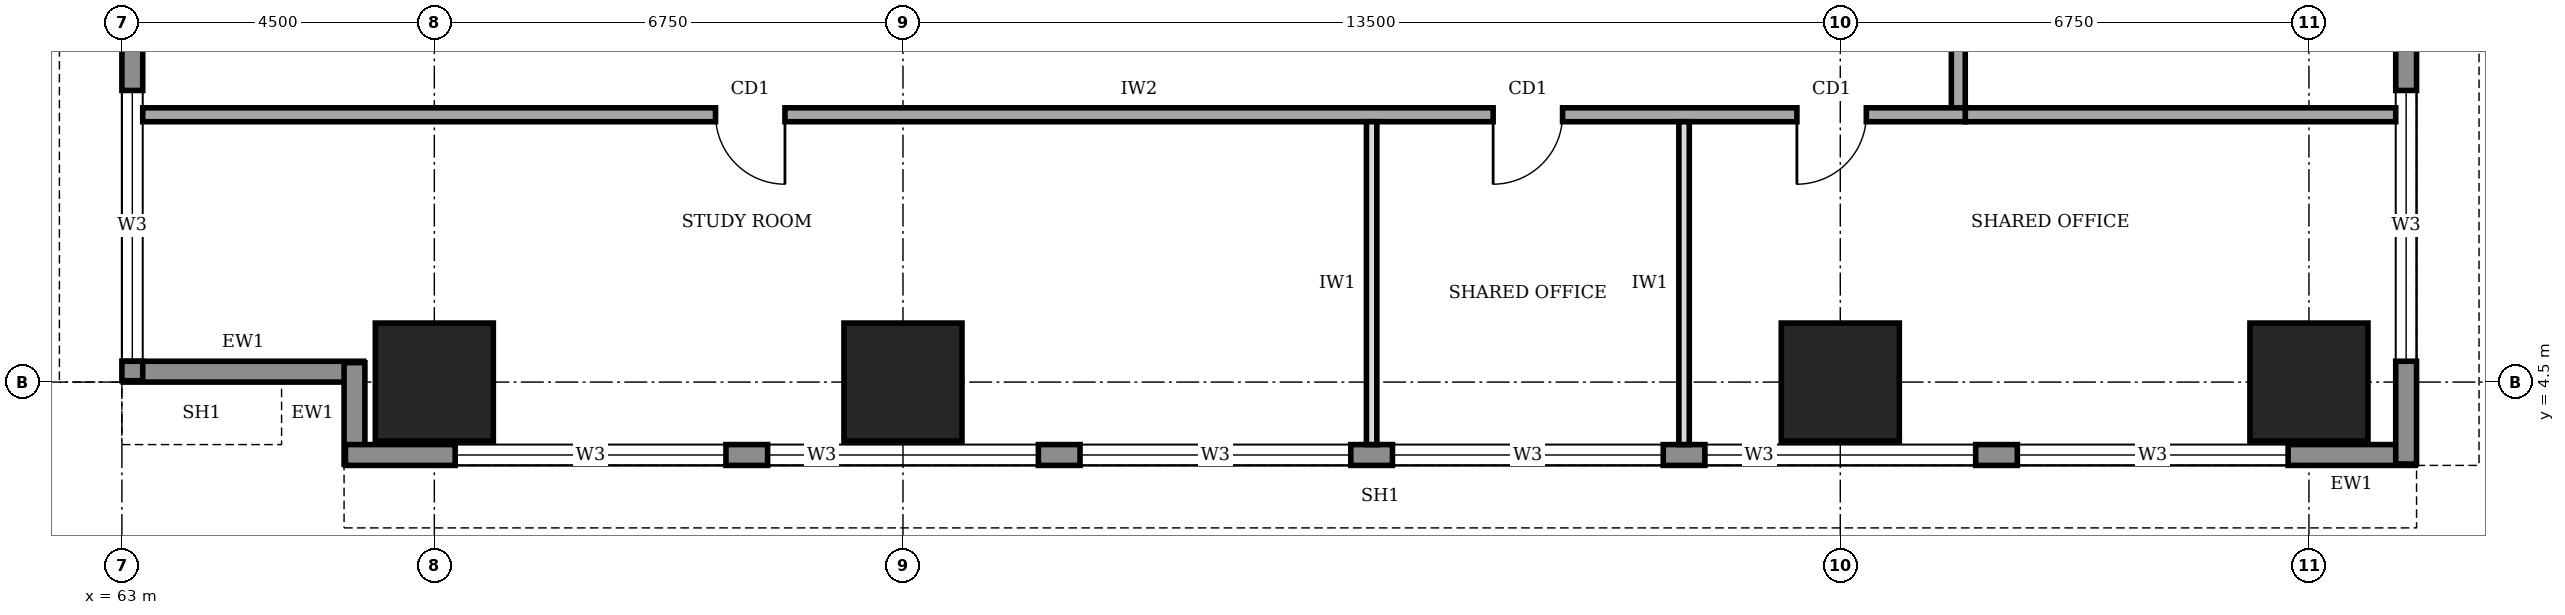
"""IFC4 building model, lengths in metres.
Left out: names, types, materials, properties, quantities, classifications, styles, units other than length and angle.
Written with IfcOpenShell. Run it as: python <this file> out.ifc"""

import sys

from ifc_helpers import new_model, si_unit, direction, frame, frame_2d, origin, origin_2d, place, context, subcontext, project, spatial, rectangle, extrude, element, fill, save


model = new_model("IFC4")
c1 = context("Model", 3, precision=1e-05, world=origin(), true_north=direction((0.0, 1.0)))
c2 = subcontext(c1, "Body", "Model", "MODEL_VIEW")
j1 = project(units=[si_unit("LENGTHUNIT", "METRE"), si_unit("PLANEANGLEUNIT", "RADIAN")], contexts=[c1])
p1 = place(None, origin())
s1 = spatial("IfcSite", under=j1, at=p1, CompositionType="ELEMENT")
p2 = place(p1, origin())
s2 = spatial("IfcBuilding", under=s1, at=p2, CompositionType="ELEMENT")
p3 = place(p2, frame((0.0, 0.0, 101.0)))
s3 = spatial("IfcBuildingStorey", under=s2, at=p3, CompositionType="ELEMENT", Elevation=101.0)
for number, where, z_axis, x_axis in (
    (1, (67.5, 4.5, 0.0), (0.0, 0.0, 1.0), (1.0, 0.0, 0.0)),
    (2, (74.25, 4.5, 0.0), (0.0, 0.0, 1.0), (1.0, 0.0, 0.0)),
    (3, (87.75, 4.5, 0.0), (0.0, 0.0, 1.0), (1.0, 0.0, 0.0)),
    (4, (94.5, 4.5, 0.0), (0.0, 0.0, 1.0), (1.0, 0.0, 0.0)),
):
    element("IfcColumn", number, at=place(p3, frame(where, z_axis=z_axis, x_axis=x_axis)), inside=s3, PredefinedType="COLUMN", context=c2, shape_type="SweptSolid", body=[
        extrude(rectangle(XDim=1.7, YDim=1.7, at=origin_2d()), origin(), (0.0, 0.0, 1.0), 4.0),
    ])
p4 = place(p3, frame((63.02, 4.65, 0.0), z_axis=(0.0, 0.0, 1.0), x_axis=(1.0, 0.0, 0.0)))
e5 = element("IfcWall", 5, at=p4, inside=s3, PredefinedType="STANDARD", context=c2, shape_type="SweptSolid", body=[
    extrude(rectangle(XDim=3.46, YDim=0.3, at=frame_2d((1.73, 0.0))), origin(), (0.0, 0.0, 1.0), 2.85),
])
p5 = place(p3, frame((66.35, 4.78, 0.0), z_axis=(0.0, 0.0, 1.0), x_axis=(0.0, -1.0, 0.0)))
e6 = element("IfcWall", 6, at=p5, inside=s3, PredefinedType="STANDARD", context=c2, shape_type="SweptSolid", body=[
    extrude(rectangle(XDim=1.46, YDim=0.3, at=frame_2d((0.73, 0.0))), origin(), (0.0, 0.0, 1.0), 3.75),
])
p6 = place(p3, frame((66.22, 3.45, 0.0), z_axis=(0.0, 0.0, 1.0), x_axis=(1.0, 0.0, 0.0)))
e7 = element("IfcWall", 7, at=p6, inside=s3, PredefinedType="STANDARD", context=c2, shape_type="SweptSolid", body=[
    extrude(rectangle(XDim=29.81, YDim=0.3, at=frame_2d((14.905, 0.0))), origin(), (0.0, 0.0, 1.0), 3.75),
])
p7 = place(p6, frame((1.58, 0.0, 0.95)))
e8 = element("IfcOpeningElement", 8, at=p7, cuts=e7, PredefinedType="OPENING", context=c2, shape_type="SweptSolid", body=[
    extrude(rectangle(XDim=3.9, YDim=1.8, at=frame_2d((1.95, 0.9))), frame((0.0, 0.16, 0.0), z_axis=(0.0, -1.0, 0.0), x_axis=(1.0, 0.0, 0.0)), (0.0, 0.0, 1.0), 0.32),
])
p8 = place(p6, frame((6.08, 0.0, 0.95)))
e9 = element("IfcOpeningElement", 9, at=p8, cuts=e7, PredefinedType="OPENING", context=c2, shape_type="SweptSolid", body=[
    extrude(rectangle(XDim=3.9, YDim=1.8, at=frame_2d((1.95, 0.9))), frame((0.0, 0.16, 0.0), z_axis=(0.0, -1.0, 0.0), x_axis=(1.0, 0.0, 0.0)), (0.0, 0.0, 1.0), 0.32),
])
p9 = place(p6, frame((10.58, 0.0, 0.95)))
e10 = element("IfcOpeningElement", 10, at=p9, cuts=e7, PredefinedType="OPENING", context=c2, shape_type="SweptSolid", body=[
    extrude(rectangle(XDim=3.9, YDim=1.8, at=frame_2d((1.95, 0.9))), frame((0.0, 0.16, 0.0), z_axis=(0.0, -1.0, 0.0), x_axis=(1.0, 0.0, 0.0)), (0.0, 0.0, 1.0), 0.32),
])
p10 = place(p6, frame((15.08, 0.0, 0.95)))
e11 = element("IfcOpeningElement", 11, at=p10, cuts=e7, PredefinedType="OPENING", context=c2, shape_type="SweptSolid", body=[
    extrude(rectangle(XDim=3.9, YDim=1.8, at=frame_2d((1.95, 0.9))), frame((0.0, 0.16, 0.0), z_axis=(0.0, -1.0, 0.0), x_axis=(1.0, 0.0, 0.0)), (0.0, 0.0, 1.0), 0.32),
])
p11 = place(p6, frame((19.58, 0.0, 0.95)))
e12 = element("IfcOpeningElement", 12, at=p11, cuts=e7, PredefinedType="OPENING", context=c2, shape_type="SweptSolid", body=[
    extrude(rectangle(XDim=3.9, YDim=1.8, at=frame_2d((1.95, 0.9))), frame((0.0, 0.16, 0.0), z_axis=(0.0, -1.0, 0.0), x_axis=(1.0, 0.0, 0.0)), (0.0, 0.0, 1.0), 0.32),
])
p12 = place(p6, frame((24.08, 0.0, 0.95)))
e13 = element("IfcOpeningElement", 13, at=p12, cuts=e7, PredefinedType="OPENING", context=c2, shape_type="SweptSolid", body=[
    extrude(rectangle(XDim=3.9, YDim=1.8, at=frame_2d((1.95, 0.9))), frame((0.0, 0.16, 0.0), z_axis=(0.0, -1.0, 0.0), x_axis=(1.0, 0.0, 0.0)), (0.0, 0.0, 1.0), 0.32),
])
p13 = place(p3, frame((95.9, 3.32, 0.0), z_axis=(0.0, 0.0, 1.0), x_axis=(0.0, 1.0, 0.0)))
e14 = element("IfcWall", 14, at=p13, inside=s3, PredefinedType="STANDARD", context=c2, shape_type="SweptSolid", body=[
    extrude(rectangle(XDim=33.96, YDim=0.3, at=frame_2d((16.98, 0.0))), origin(), (0.0, 0.0, 1.0), 3.75),
])
p14 = place(p13, frame((1.48, 0.0, 0.95)))
e15 = element("IfcOpeningElement", 15, at=p14, cuts=e14, PredefinedType="OPENING", context=c2, shape_type="SweptSolid", body=[
    extrude(rectangle(XDim=3.9, YDim=1.8, at=frame_2d((1.95, 0.9))), frame((0.0, 0.16, 0.0), z_axis=(0.0, -1.0, 0.0), x_axis=(1.0, 0.0, 0.0)), (0.0, 0.0, 1.0), 0.32),
])
p15 = place(p13, frame((5.98, 0.0, 0.95)))
e16 = element("IfcOpeningElement", 16, at=p15, cuts=e14, PredefinedType="OPENING", context=c2, shape_type="SweptSolid", body=[
    extrude(rectangle(XDim=3.9, YDim=1.8, at=frame_2d((1.95, 0.9))), frame((0.0, 0.16, 0.0), z_axis=(0.0, -1.0, 0.0), x_axis=(1.0, 0.0, 0.0)), (0.0, 0.0, 1.0), 0.32),
])
p16 = place(p13, frame((10.48, 0.0, 0.95)))
e17 = element("IfcOpeningElement", 17, at=p16, cuts=e14, PredefinedType="OPENING", context=c2, shape_type="SweptSolid", body=[
    extrude(rectangle(XDim=3.9, YDim=1.8, at=frame_2d((1.95, 0.9))), frame((0.0, 0.16, 0.0), z_axis=(0.0, -1.0, 0.0), x_axis=(1.0, 0.0, 0.0)), (0.0, 0.0, 1.0), 0.32),
])
p17 = place(p13, frame((14.98, 0.0, 0.95)))
e18 = element("IfcOpeningElement", 18, at=p17, cuts=e14, PredefinedType="OPENING", context=c2, shape_type="SweptSolid", body=[
    extrude(rectangle(XDim=3.9, YDim=1.8, at=frame_2d((1.95, 0.9))), frame((0.0, 0.16, 0.0), z_axis=(0.0, -1.0, 0.0), x_axis=(1.0, 0.0, 0.0)), (0.0, 0.0, 1.0), 0.32),
])
p18 = place(p13, frame((19.48, 0.0, 0.95)))
e19 = element("IfcOpeningElement", 19, at=p18, cuts=e14, PredefinedType="OPENING", context=c2, shape_type="SweptSolid", body=[
    extrude(rectangle(XDim=3.9, YDim=1.8, at=frame_2d((1.95, 0.9))), frame((0.0, 0.16, 0.0), z_axis=(0.0, -1.0, 0.0), x_axis=(1.0, 0.0, 0.0)), (0.0, 0.0, 1.0), 0.32),
])
p19 = place(p13, frame((23.98, 0.0, 0.95)))
e20 = element("IfcOpeningElement", 20, at=p19, cuts=e14, PredefinedType="OPENING", context=c2, shape_type="SweptSolid", body=[
    extrude(rectangle(XDim=3.9, YDim=1.8, at=frame_2d((1.95, 0.9))), frame((0.0, 0.16, 0.0), z_axis=(0.0, -1.0, 0.0), x_axis=(1.0, 0.0, 0.0)), (0.0, 0.0, 1.0), 0.32),
])
p20 = place(p13, frame((28.48, 0.0, 0.95)))
e21 = element("IfcOpeningElement", 21, at=p20, cuts=e14, PredefinedType="OPENING", context=c2, shape_type="SweptSolid", body=[
    extrude(rectangle(XDim=3.9, YDim=1.8, at=frame_2d((1.95, 0.9))), frame((0.0, 0.16, 0.0), z_axis=(0.0, -1.0, 0.0), x_axis=(1.0, 0.0, 0.0)), (0.0, 0.0, 1.0), 0.32),
])
p21 = place(p3, frame((63.3, 8.35, 0.0), z_axis=(0.0, 0.0, 1.0), x_axis=(1.0, 0.0, 0.0)))
e22 = element("IfcWall", 22, at=p21, inside=s3, PredefinedType="SOLIDWALL", context=c2, shape_type="SweptSolid", body=[
    extrude(rectangle(XDim=26.25, YDim=0.2, at=frame_2d((13.125, 0.0))), origin(), (0.0, 0.0, 1.0), 3.75),
])
p22 = place(p21, frame((8.25, 0.0, 0.0)))
e23 = element("IfcOpeningElement", 23, at=p22, cuts=e22, PredefinedType="OPENING", context=c2, shape_type="SweptSolid", body=[
    extrude(rectangle(XDim=1.0, YDim=2.1, at=frame_2d((0.5, 1.05))), frame((0.0, 0.11, 0.0), z_axis=(0.0, -1.0, 0.0), x_axis=(1.0, 0.0, 0.0)), (0.0, 0.0, 1.0), 0.22),
])
p23 = place(p21, frame((19.45, 0.0, 0.0)))
e24 = element("IfcOpeningElement", 24, at=p23, cuts=e22, PredefinedType="OPENING", context=c2, shape_type="SweptSolid", body=[
    extrude(rectangle(XDim=1.0, YDim=2.1, at=frame_2d((0.5, 1.05))), frame((0.0, 0.11, 0.0), z_axis=(0.0, -1.0, 0.0), x_axis=(1.0, 0.0, 0.0)), (0.0, 0.0, 1.0), 0.22),
])
p24 = place(p21, frame((23.825, 0.0, 0.0)))
e25 = element("IfcOpeningElement", 25, at=p24, cuts=e22, PredefinedType="OPENING", context=c2, shape_type="SweptSolid", body=[
    extrude(rectangle(XDim=1.0, YDim=2.1, at=frame_2d((0.5, 1.05))), frame((0.0, 0.11, 0.0), z_axis=(0.0, -1.0, 0.0), x_axis=(1.0, 0.0, 0.0)), (0.0, 0.0, 1.0), 0.22),
])
p25 = place(p3, frame((89.45, 8.45, 0.0), z_axis=(0.0, 0.0, 1.0), x_axis=(0.0, 1.0, 0.0)))
e26 = element("IfcWall", 26, at=p25, inside=s3, PredefinedType="SOLIDWALL", context=c2, shape_type="SweptSolid", body=[
    extrude(rectangle(XDim=23.8, YDim=0.2, at=frame_2d((11.9, 0.0))), origin(), (0.0, 0.0, 1.0), 3.75),
])
p26 = place(p25, frame((1.925, 0.0, 0.0)))
e27 = element("IfcOpeningElement", 27, at=p26, cuts=e26, PredefinedType="OPENING", context=c2, shape_type="SweptSolid", body=[
    extrude(rectangle(XDim=1.0, YDim=2.1, at=frame_2d((0.5, 1.05))), frame((0.0, 0.11, 0.0), z_axis=(0.0, -1.0, 0.0), x_axis=(1.0, 0.0, 0.0)), (0.0, 0.0, 1.0), 0.22),
])
p27 = place(p25, frame((5.8, 0.0, 0.0)))
e28 = element("IfcOpeningElement", 28, at=p27, cuts=e26, PredefinedType="OPENING", context=c2, shape_type="SweptSolid", body=[
    extrude(rectangle(XDim=0.9, YDim=2.1, at=frame_2d((0.45, 1.05))), frame((0.0, 0.11, 0.0), z_axis=(0.0, -1.0, 0.0), x_axis=(1.0, 0.0, 0.0)), (0.0, 0.0, 1.0), 0.22),
])
p28 = place(p25, frame((9.0, 0.0, 0.0)))
e29 = element("IfcOpeningElement", 29, at=p28, cuts=e26, PredefinedType="OPENING", context=c2, shape_type="SweptSolid", body=[
    extrude(rectangle(XDim=0.9, YDim=2.1, at=frame_2d((0.45, 1.05))), frame((0.0, 0.11, 0.0), z_axis=(0.0, -1.0, 0.0), x_axis=(1.0, 0.0, 0.0)), (0.0, 0.0, 1.0), 0.22),
])
p29 = place(p25, frame((14.55, 0.0, 0.0)))
e30 = element("IfcOpeningElement", 30, at=p29, cuts=e26, PredefinedType="OPENING", context=c2, shape_type="SweptSolid", body=[
    extrude(rectangle(XDim=0.9, YDim=2.1, at=frame_2d((0.45, 1.05))), frame((0.0, 0.11, 0.0), z_axis=(0.0, -1.0, 0.0), x_axis=(1.0, 0.0, 0.0)), (0.0, 0.0, 1.0), 0.22),
])
p30 = place(p25, frame((17.05, 0.0, 0.0)))
e31 = element("IfcOpeningElement", 31, at=p30, cuts=e26, PredefinedType="OPENING", context=c2, shape_type="SweptSolid", body=[
    extrude(rectangle(XDim=1.0, YDim=2.1, at=frame_2d((0.5, 1.05))), frame((0.0, 0.11, 0.0), z_axis=(0.0, -1.0, 0.0), x_axis=(1.0, 0.0, 0.0)), (0.0, 0.0, 1.0), 0.22),
])
p31 = place(p25, frame((11.95, 0.0, 0.0)))
e32 = element("IfcOpeningElement", 32, at=p31, cuts=e26, PredefinedType="OPENING", context=c2, shape_type="SweptSolid", body=[
    extrude(rectangle(XDim=1.0, YDim=2.1, at=frame_2d((0.5, 1.05))), frame((0.0, 0.11, 0.0), z_axis=(0.0, -1.0, 0.0), x_axis=(1.0, 0.0, 0.0)), (0.0, 0.0, 1.0), 0.22),
])
p32 = place(p25, frame((20.675, 0.0, 0.0)))
e33 = element("IfcOpeningElement", 33, at=p32, cuts=e26, PredefinedType="OPENING", context=c2, shape_type="SweptSolid", body=[
    extrude(rectangle(XDim=1.0, YDim=2.1, at=frame_2d((0.5, 1.05))), frame((0.0, 0.11, 0.0), z_axis=(0.0, -1.0, 0.0), x_axis=(1.0, 0.0, 0.0)), (0.0, 0.0, 1.0), 0.22),
])
p33 = place(p3, frame((89.55, 8.35, 0.0), z_axis=(0.0, 0.0, 1.0), x_axis=(1.0, 0.0, 0.0)))
e34 = element("IfcWall", 34, at=p33, inside=s3, PredefinedType="SOLIDWALL", context=c2, shape_type="SweptSolid", body=[
    extrude(rectangle(XDim=6.2, YDim=0.2, at=frame_2d((3.1, 0.0))), origin(), (0.0, 0.0, 1.0), 3.75),
])
for number, where, z_axis, x_axis in (
    (35, (81.0, 3.6, 0.0), (0.0, 0.0, 1.0), (0.0, 1.0, 0.0)),
    (36, (85.5, 3.6, 0.0), (0.0, 0.0, 1.0), (0.0, 1.0, 0.0)),
):
    element("IfcWall", number, at=place(p3, frame(where, z_axis=z_axis, x_axis=x_axis)), inside=s3, PredefinedType="PARTITIONING", context=c2, shape_type="SweptSolid", body=[
        extrude(rectangle(XDim=4.65, YDim=0.15, at=frame_2d((2.325, 0.0))), origin(), (0.0, 0.0, 1.0), 3.75),
    ])
p34 = place(p3, frame((63.15, 11.25, 0.0), z_axis=(0.0, 0.0, 1.0), x_axis=(0.0, -1.0, 0.0)))
e37 = element("IfcWall", 37, at=p34, inside=s3, PredefinedType="STANDARD", context=c2, shape_type="SweptSolid", body=[
    extrude(rectangle(XDim=6.73, YDim=0.3, at=frame_2d((3.365, 0.0))), origin(), (0.0, 0.0, 1.0), 3.75),
])
p35 = place(p34, frame((2.55, 0.0, 0.95)))
e38 = element("IfcOpeningElement", 38, at=p35, cuts=e37, PredefinedType="OPENING", context=c2, shape_type="SweptSolid", body=[
    extrude(rectangle(XDim=3.9, YDim=1.8, at=frame_2d((1.95, 0.9))), frame((0.0, 0.16, 0.0), z_axis=(0.0, -1.0, 0.0), x_axis=(1.0, 0.0, 0.0)), (0.0, 0.0, 1.0), 0.32),
])
p36 = place(p7, origin())
e39 = element("IfcWindow", 39, at=p36, inside=s3, PartitioningType="SINGLE_PANEL", PredefinedType="WINDOW", context=c2, shape_type="SweptSolid", body=[
    extrude(rectangle(XDim=3.9, YDim=1.8, at=frame_2d((1.95, 0.9))), frame((0.0, 0.03, 0.0), z_axis=(0.0, -1.0, 0.0), x_axis=(1.0, 0.0, 0.0)), (0.0, 0.0, 1.0), 0.06),
])
fill(e8, e39)
p37 = place(p8, origin())
e40 = element("IfcWindow", 40, at=p37, inside=s3, PartitioningType="SINGLE_PANEL", PredefinedType="WINDOW", context=c2, shape_type="SweptSolid", body=[
    extrude(rectangle(XDim=3.9, YDim=1.8, at=frame_2d((1.95, 0.9))), frame((0.0, 0.03, 0.0), z_axis=(0.0, -1.0, 0.0), x_axis=(1.0, 0.0, 0.0)), (0.0, 0.0, 1.0), 0.06),
])
fill(e9, e40)
p38 = place(p9, origin())
e41 = element("IfcWindow", 41, at=p38, inside=s3, PartitioningType="SINGLE_PANEL", PredefinedType="WINDOW", context=c2, shape_type="SweptSolid", body=[
    extrude(rectangle(XDim=3.9, YDim=1.8, at=frame_2d((1.95, 0.9))), frame((0.0, 0.03, 0.0), z_axis=(0.0, -1.0, 0.0), x_axis=(1.0, 0.0, 0.0)), (0.0, 0.0, 1.0), 0.06),
])
fill(e10, e41)
p39 = place(p10, origin())
e42 = element("IfcWindow", 42, at=p39, inside=s3, PartitioningType="SINGLE_PANEL", PredefinedType="WINDOW", context=c2, shape_type="SweptSolid", body=[
    extrude(rectangle(XDim=3.9, YDim=1.8, at=frame_2d((1.95, 0.9))), frame((0.0, 0.03, 0.0), z_axis=(0.0, -1.0, 0.0), x_axis=(1.0, 0.0, 0.0)), (0.0, 0.0, 1.0), 0.06),
])
fill(e11, e42)
p40 = place(p11, origin())
e43 = element("IfcWindow", 43, at=p40, inside=s3, PartitioningType="SINGLE_PANEL", PredefinedType="WINDOW", context=c2, shape_type="SweptSolid", body=[
    extrude(rectangle(XDim=3.9, YDim=1.8, at=frame_2d((1.95, 0.9))), frame((0.0, 0.03, 0.0), z_axis=(0.0, -1.0, 0.0), x_axis=(1.0, 0.0, 0.0)), (0.0, 0.0, 1.0), 0.06),
])
fill(e12, e43)
p41 = place(p12, origin())
e44 = element("IfcWindow", 44, at=p41, inside=s3, PartitioningType="SINGLE_PANEL", PredefinedType="WINDOW", context=c2, shape_type="SweptSolid", body=[
    extrude(rectangle(XDim=3.9, YDim=1.8, at=frame_2d((1.95, 0.9))), frame((0.0, 0.03, 0.0), z_axis=(0.0, -1.0, 0.0), x_axis=(1.0, 0.0, 0.0)), (0.0, 0.0, 1.0), 0.06),
])
fill(e13, e44)
p42 = place(p14, origin())
e45 = element("IfcWindow", 45, at=p42, inside=s3, PartitioningType="SINGLE_PANEL", PredefinedType="WINDOW", context=c2, shape_type="SweptSolid", body=[
    extrude(rectangle(XDim=3.9, YDim=1.8, at=frame_2d((1.95, 0.9))), frame((0.0, 0.03, 0.0), z_axis=(0.0, -1.0, 0.0), x_axis=(1.0, 0.0, 0.0)), (0.0, 0.0, 1.0), 0.06),
])
fill(e15, e45)
p43 = place(p35, origin())
e46 = element("IfcWindow", 46, at=p43, inside=s3, PartitioningType="SINGLE_PANEL", PredefinedType="WINDOW", context=c2, shape_type="SweptSolid", body=[
    extrude(rectangle(XDim=3.9, YDim=1.8, at=frame_2d((1.95, 0.9))), frame((0.0, 0.03, 0.0), z_axis=(0.0, -1.0, 0.0), x_axis=(1.0, 0.0, 0.0)), (0.0, 0.0, 1.0), 0.06),
])
fill(e38, e46)
p44 = place(p22, frame((1.0, 0.0, 0.0), z_axis=(0.0, 0.0, 1.0), x_axis=(-1.0, 0.0, 0.0)))
e47 = element("IfcDoor", 47, at=p44, inside=s3, OperationType="SINGLE_SWING_LEFT", PredefinedType="DOOR", context=c2, shape_type="SweptSolid", body=[
    extrude(rectangle(XDim=1.0, YDim=2.1, at=frame_2d((0.5, 1.05))), frame((0.0, 0.025, 0.0), z_axis=(0.0, -1.0, 0.0), x_axis=(1.0, 0.0, 0.0)), (0.0, 0.0, 1.0), 0.05),
])
fill(e23, e47)
p45 = place(p23, frame((1.0, 0.0, 0.0), z_axis=(0.0, 0.0, 1.0), x_axis=(-1.0, 0.0, 0.0)))
e48 = element("IfcDoor", 48, at=p45, inside=s3, OperationType="SINGLE_SWING_RIGHT", PredefinedType="DOOR", context=c2, shape_type="SweptSolid", body=[
    extrude(rectangle(XDim=1.0, YDim=2.1, at=frame_2d((0.5, 1.05))), frame((0.0, 0.025, 0.0), z_axis=(0.0, -1.0, 0.0), x_axis=(1.0, 0.0, 0.0)), (0.0, 0.0, 1.0), 0.05),
])
fill(e24, e48)
p46 = place(p24, frame((1.0, 0.0, 0.0), z_axis=(0.0, 0.0, 1.0), x_axis=(-1.0, 0.0, 0.0)))
e49 = element("IfcDoor", 49, at=p46, inside=s3, OperationType="SINGLE_SWING_RIGHT", PredefinedType="DOOR", context=c2, shape_type="SweptSolid", body=[
    extrude(rectangle(XDim=1.0, YDim=2.1, at=frame_2d((0.5, 1.05))), frame((0.0, 0.025, 0.0), z_axis=(0.0, -1.0, 0.0), x_axis=(1.0, 0.0, 0.0)), (0.0, 0.0, 1.0), 0.05),
])
fill(e25, e49)
save(model, sys.argv[1])
